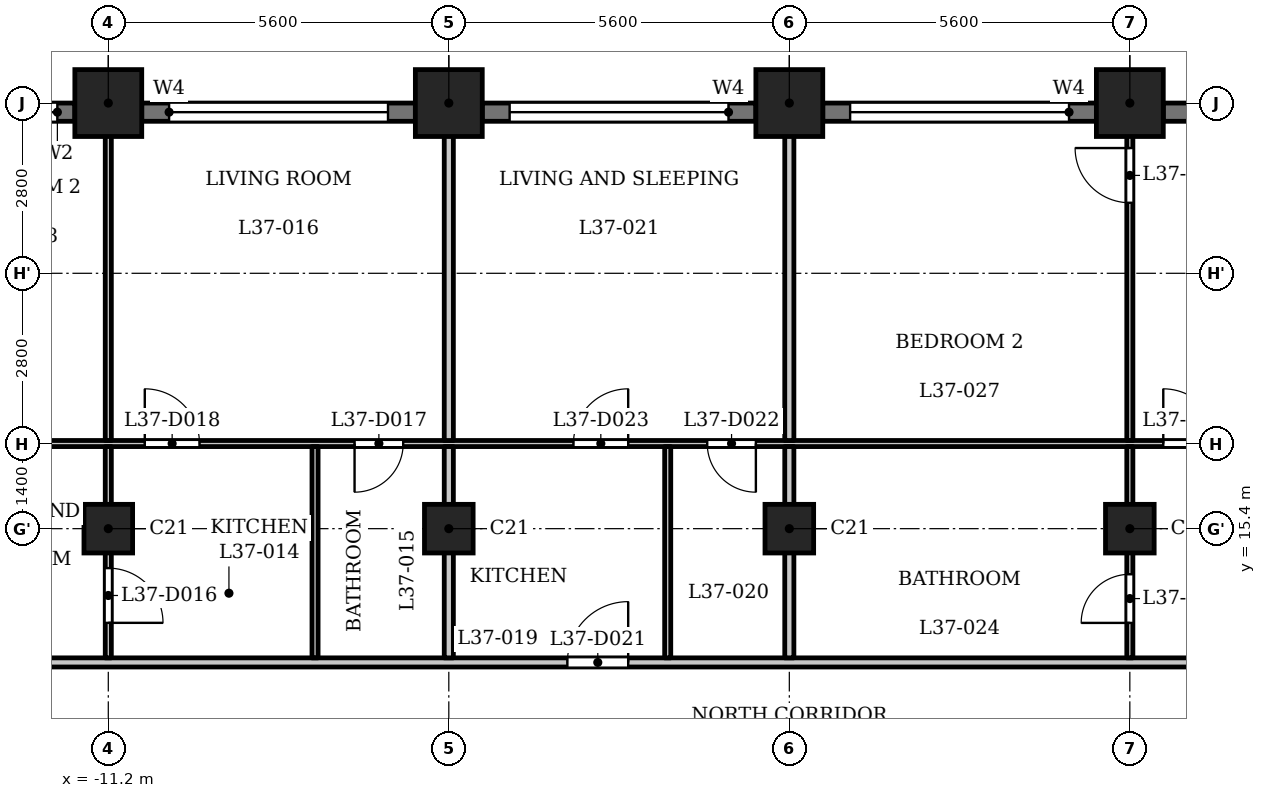
"""IFC4 building model, lengths in metres.
Left out: names, types, materials, properties, quantities, classifications, styles, units other than length and angle.
Written with IfcOpenShell. Run it as: python <this file> out.ifc"""

import sys

from ifc_helpers import new_model, si_unit, direction, frame, frame_2d, origin, origin_2d, place, context, subcontext, project, spatial, rectangle, extrude, element, fill, save


model = new_model("IFC4")
c1 = context("Model", 3, precision=1e-05, world=origin(), true_north=direction((0.0, 1.0)))
c2 = subcontext(c1, "Body", "Model", "MODEL_VIEW")
j1 = project(units=[si_unit("LENGTHUNIT", "METRE"), si_unit("PLANEANGLEUNIT", "RADIAN")], contexts=[c1])
p1 = place(None, origin())
s1 = spatial("IfcSite", under=j1, at=p1, CompositionType="ELEMENT")
p2 = place(p1, origin())
s2 = spatial("IfcBuilding", under=s1, at=p2, CompositionType="ELEMENT")
p3 = place(p2, frame((0.0, 0.0, 146.6)))
s3 = spatial("IfcBuildingStorey", under=s2, at=p3, CompositionType="ELEMENT", Elevation=146.6)
for number, where, z_axis, x_axis in (
    (1, (5.6, 22.4, 0.0), (0.0, 0.0, 1.0), (1.0, 0.0, 0.0)),
    (2, (0.0, 22.4, 0.0), (0.0, 0.0, 1.0), (1.0, 0.0, 0.0)),
    (3, (-5.6, 22.4, 0.0), (0.0, 0.0, 1.0), (1.0, 0.0, 0.0)),
    (4, (-11.2, 22.4, 0.0), (0.0, 0.0, 1.0), (1.0, 0.0, 0.0)),
):
    element("IfcColumn", number, at=place(p3, frame(where, z_axis=z_axis, x_axis=x_axis)), inside=s3, PredefinedType="COLUMN", context=c2, shape_type="SweptSolid", body=[
        extrude(rectangle(XDim=1.1, YDim=1.1, at=origin_2d()), origin(), (0.0, 0.0, 1.0), 3.5),
    ])
for number, where, z_axis, x_axis in (
    (5, (-11.2, 15.4, 0.0), (0.0, 0.0, 1.0), (1.0, 0.0, 0.0)),
    (6, (-5.6, 15.4, 0.0), (0.0, 0.0, 1.0), (1.0, 0.0, 0.0)),
    (7, (0.0, 15.4, 0.0), (0.0, 0.0, 1.0), (1.0, 0.0, 0.0)),
    (8, (5.6, 15.4, 0.0), (0.0, 0.0, 1.0), (1.0, 0.0, 0.0)),
):
    element("IfcColumn", number, at=place(p3, frame(where, z_axis=z_axis, x_axis=x_axis)), inside=s3, PredefinedType="COLUMN", context=c2, shape_type="SweptSolid", body=[
        extrude(rectangle(XDim=0.8, YDim=0.8, at=origin_2d()), origin(), (0.0, 0.0, 1.0), 3.5),
    ])
p4 = place(p3, frame((10.65, 22.25, 0.0), z_axis=(0.0, 0.0, 1.0), x_axis=(-1.0, 0.0, 0.0)))
e9 = element("IfcWall", 9, at=p4, inside=s3, PredefinedType="SOLIDWALL", context=c2, shape_type="SweptSolid", body=[
    extrude(rectangle(XDim=4.5, YDim=0.3, at=frame_2d((2.25, 0.0))), origin(), (0.0, 0.0, 1.0), 2.45),
])
p5 = place(p4, frame((0.45, 0.0, 1.2)))
e10 = element("IfcOpeningElement", 10, at=p5, cuts=e9, PredefinedType="OPENING", context=c2, shape_type="SweptSolid", body=[
    extrude(rectangle(XDim=3.6, YDim=0.95, at=frame_2d((1.8, 0.475))), frame((0.0, 0.16, 0.0), z_axis=(0.0, -1.0, 0.0), x_axis=(1.0, 0.0, 0.0)), (0.0, 0.0, 1.0), 0.32),
])
p6 = place(p3, frame((5.05, 22.25, 0.0), z_axis=(0.0, 0.0, 1.0), x_axis=(-1.0, 0.0, 0.0)))
e11 = element("IfcWall", 11, at=p6, inside=s3, PredefinedType="SOLIDWALL", context=c2, shape_type="SweptSolid", body=[
    extrude(rectangle(XDim=4.5, YDim=0.3, at=frame_2d((2.25, 0.0))), origin(), (0.0, 0.0, 1.0), 2.45),
])
p7 = place(p6, frame((0.45, 0.0, 1.2)))
e12 = element("IfcOpeningElement", 12, at=p7, cuts=e11, PredefinedType="OPENING", context=c2, shape_type="SweptSolid", body=[
    extrude(rectangle(XDim=3.6, YDim=0.95, at=frame_2d((1.8, 0.475))), frame((0.0, 0.16, 0.0), z_axis=(0.0, -1.0, 0.0), x_axis=(1.0, 0.0, 0.0)), (0.0, 0.0, 1.0), 0.32),
])
p8 = place(p3, frame((-0.55, 22.25, 0.0), z_axis=(0.0, 0.0, 1.0), x_axis=(-1.0, 0.0, 0.0)))
e13 = element("IfcWall", 13, at=p8, inside=s3, PredefinedType="SOLIDWALL", context=c2, shape_type="SweptSolid", body=[
    extrude(rectangle(XDim=4.5, YDim=0.3, at=frame_2d((2.25, 0.0))), origin(), (0.0, 0.0, 1.0), 2.45),
])
p9 = place(p8, frame((0.45, 0.0, 1.2)))
e14 = element("IfcOpeningElement", 14, at=p9, cuts=e13, PredefinedType="OPENING", context=c2, shape_type="SweptSolid", body=[
    extrude(rectangle(XDim=3.6, YDim=0.95, at=frame_2d((1.8, 0.475))), frame((0.0, 0.16, 0.0), z_axis=(0.0, -1.0, 0.0), x_axis=(1.0, 0.0, 0.0)), (0.0, 0.0, 1.0), 0.32),
])
p10 = place(p3, frame((-6.15, 22.25, 0.0), z_axis=(0.0, 0.0, 1.0), x_axis=(-1.0, 0.0, 0.0)))
e15 = element("IfcWall", 15, at=p10, inside=s3, PredefinedType="SOLIDWALL", context=c2, shape_type="SweptSolid", body=[
    extrude(rectangle(XDim=4.5, YDim=0.3, at=frame_2d((2.25, 0.0))), origin(), (0.0, 0.0, 1.0), 2.45),
])
p11 = place(p10, frame((0.45, 0.0, 1.2)))
e16 = element("IfcOpeningElement", 16, at=p11, cuts=e15, PredefinedType="OPENING", context=c2, shape_type="SweptSolid", body=[
    extrude(rectangle(XDim=3.6, YDim=0.95, at=frame_2d((1.8, 0.475))), frame((0.0, 0.16, 0.0), z_axis=(0.0, -1.0, 0.0), x_axis=(1.0, 0.0, 0.0)), (0.0, 0.0, 1.0), 0.32),
])
p12 = place(p3, frame((-11.75, 22.25, 0.0), z_axis=(0.0, 0.0, 1.0), x_axis=(-1.0, 0.0, 0.0)))
e17 = element("IfcWall", 17, at=p12, inside=s3, PredefinedType="SOLIDWALL", context=c2, shape_type="SweptSolid", body=[
    extrude(rectangle(XDim=4.5, YDim=0.3, at=frame_2d((2.25, 0.0))), origin(), (0.0, 0.0, 1.0), 2.45),
])
p13 = place(p12, frame((0.288, 0.0, 0.9)))
e18 = element("IfcOpeningElement", 18, at=p13, cuts=e17, PredefinedType="OPENING", context=c2, shape_type="SweptSolid", body=[
    extrude(rectangle(XDim=1.8, YDim=1.25, at=frame_2d((0.9, 0.625))), frame((0.0, 0.16, 0.0), z_axis=(0.0, -1.0, 0.0), x_axis=(1.0, 0.0, 0.0)), (0.0, 0.0, 1.0), 0.32),
])
p14 = place(p12, frame((2.913, 0.0, 0.6)))
e19 = element("IfcOpeningElement", 19, at=p14, cuts=e17, PredefinedType="OPENING", context=c2, shape_type="SweptSolid", body=[
    extrude(rectangle(XDim=1.2, YDim=1.55, at=frame_2d((0.6, 0.775))), frame((0.0, 0.16, 0.0), z_axis=(0.0, -1.0, 0.0), x_axis=(1.0, 0.0, 0.0)), (0.0, 0.0, 1.0), 0.32),
])
p15 = place(p3, frame((-17.4, 13.2, 0.0), z_axis=(0.0, 0.0, 1.0), x_axis=(1.0, 0.0, 0.0)))
e20 = element("IfcWall", 20, at=p15, inside=s3, PredefinedType="PARTITIONING", context=c2, shape_type="SweptSolid", body=[
    extrude(rectangle(XDim=34.8, YDim=0.15, at=frame_2d((17.4, 0.0))), origin(), (0.0, 0.0, 1.0), 3.2),
])
p16 = place(p15, frame((0.25, 0.0, 0.0)))
e21 = element("IfcOpeningElement", 21, at=p16, cuts=e20, PredefinedType="OPENING", context=c2, shape_type="SweptSolid", body=[
    extrude(rectangle(XDim=1.0, YDim=2.1, at=frame_2d((0.5, 1.05))), frame((0.0, 0.085, 0.0), z_axis=(0.0, -1.0, 0.0), x_axis=(1.0, 0.0, 0.0)), (0.0, 0.0, 1.0), 0.17),
])
p17 = place(p15, frame((33.65, 0.0, 0.0)))
e22 = element("IfcOpeningElement", 22, at=p17, cuts=e20, PredefinedType="OPENING", context=c2, shape_type="SweptSolid", body=[
    extrude(rectangle(XDim=1.0, YDim=2.1, at=frame_2d((0.5, 1.05))), frame((0.0, 0.085, 0.0), z_axis=(0.0, -1.0, 0.0), x_axis=(1.0, 0.0, 0.0)), (0.0, 0.0, 1.0), 0.17),
])
p18 = place(p15, frame((13.75, 0.0, 0.0)))
e23 = element("IfcOpeningElement", 23, at=p18, cuts=e20, PredefinedType="OPENING", context=c2, shape_type="SweptSolid", body=[
    extrude(rectangle(XDim=1.0, YDim=2.1, at=frame_2d((0.5, 1.05))), frame((0.0, 0.085, 0.0), z_axis=(0.0, -1.0, 0.0), x_axis=(1.0, 0.0, 0.0)), (0.0, 0.0, 1.0), 0.17),
])
p19 = place(p3, frame((-16.725, 16.8, 0.0), z_axis=(0.0, 0.0, 1.0), x_axis=(1.0, 0.0, 0.0)))
e24 = element("IfcWall", 24, at=p19, inside=s3, PredefinedType="PARTITIONING", context=c2, shape_type="SweptSolid", body=[
    extrude(rectangle(XDim=33.45, YDim=0.1, at=frame_2d((16.725, 0.0))), origin(), (0.0, 0.0, 1.0), 3.2),
])
p20 = place(p19, frame((9.575, 0.0, 0.0)))
e25 = element("IfcOpeningElement", 25, at=p20, cuts=e24, PredefinedType="OPENING", context=c2, shape_type="SweptSolid", body=[
    extrude(rectangle(XDim=0.8, YDim=2.1, at=frame_2d((0.4, 1.05))), frame((0.0, 0.06, 0.0), z_axis=(0.0, -1.0, 0.0), x_axis=(1.0, 0.0, 0.0)), (0.0, 0.0, 1.0), 0.12),
])
p21 = place(p19, frame((6.125, 0.0, 0.0)))
e26 = element("IfcOpeningElement", 26, at=p21, cuts=e24, PredefinedType="OPENING", context=c2, shape_type="SweptSolid", body=[
    extrude(rectangle(XDim=0.9, YDim=2.1, at=frame_2d((0.45, 1.05))), frame((0.0, 0.06, 0.0), z_axis=(0.0, -1.0, 0.0), x_axis=(1.0, 0.0, 0.0)), (0.0, 0.0, 1.0), 0.12),
])
p22 = place(p19, frame((0.975, 0.0, 0.0)))
e27 = element("IfcOpeningElement", 27, at=p22, cuts=e24, PredefinedType="OPENING", context=c2, shape_type="SweptSolid", body=[
    extrude(rectangle(XDim=0.9, YDim=2.1, at=frame_2d((0.45, 1.05))), frame((0.0, 0.06, 0.0), z_axis=(0.0, -1.0, 0.0), x_axis=(1.0, 0.0, 0.0)), (0.0, 0.0, 1.0), 0.12),
])
p23 = place(p19, frame((3.225, 0.0, 0.0)))
e28 = element("IfcOpeningElement", 28, at=p23, cuts=e24, PredefinedType="OPENING", context=c2, shape_type="SweptSolid", body=[
    extrude(rectangle(XDim=0.9, YDim=2.1, at=frame_2d((0.45, 1.05))), frame((0.0, 0.06, 0.0), z_axis=(0.0, -1.0, 0.0), x_axis=(1.0, 0.0, 0.0)), (0.0, 0.0, 1.0), 0.12),
])
p24 = place(p19, frame((15.375, 0.0, 0.0)))
e29 = element("IfcOpeningElement", 29, at=p24, cuts=e24, PredefinedType="OPENING", context=c2, shape_type="SweptSolid", body=[
    extrude(rectangle(XDim=0.8, YDim=2.1, at=frame_2d((0.4, 1.05))), frame((0.0, 0.06, 0.0), z_axis=(0.0, -1.0, 0.0), x_axis=(1.0, 0.0, 0.0)), (0.0, 0.0, 1.0), 0.12),
])
p25 = place(p19, frame((13.175, 0.0, 0.0)))
e30 = element("IfcOpeningElement", 30, at=p25, cuts=e24, PredefinedType="OPENING", context=c2, shape_type="SweptSolid", body=[
    extrude(rectangle(XDim=0.9, YDim=2.1, at=frame_2d((0.45, 1.05))), frame((0.0, 0.06, 0.0), z_axis=(0.0, -1.0, 0.0), x_axis=(1.0, 0.0, 0.0)), (0.0, 0.0, 1.0), 0.12),
])
p26 = place(p19, frame((31.975, 0.0, 0.0)))
e31 = element("IfcOpeningElement", 31, at=p26, cuts=e24, PredefinedType="OPENING", context=c2, shape_type="SweptSolid", body=[
    extrude(rectangle(XDim=0.9, YDim=2.1, at=frame_2d((0.45, 1.05))), frame((0.0, 0.06, 0.0), z_axis=(0.0, -1.0, 0.0), x_axis=(1.0, 0.0, 0.0)), (0.0, 0.0, 1.0), 0.12),
])
p27 = place(p19, frame((22.875, 0.0, 0.0)))
e32 = element("IfcOpeningElement", 32, at=p27, cuts=e24, PredefinedType="OPENING", context=c2, shape_type="SweptSolid", body=[
    extrude(rectangle(XDim=0.9, YDim=2.1, at=frame_2d((0.45, 1.05))), frame((0.0, 0.06, 0.0), z_axis=(0.0, -1.0, 0.0), x_axis=(1.0, 0.0, 0.0)), (0.0, 0.0, 1.0), 0.12),
])
p28 = place(p3, frame((-11.2, 13.275, 0.0), z_axis=(0.0, 0.0, 1.0), x_axis=(0.0, 1.0, 0.0)))
e33 = element("IfcWall", 33, at=p28, inside=s3, PredefinedType="PARTITIONING", context=c2, shape_type="SweptSolid", body=[
    extrude(rectangle(XDim=3.475, YDim=0.1, at=frame_2d((1.738, 0.0))), origin(), (0.0, 0.0, 1.0), 3.2),
])
p29 = place(p28, frame((0.576, 0.0, 0.0)))
e34 = element("IfcOpeningElement", 34, at=p29, cuts=e33, PredefinedType="OPENING", context=c2, shape_type="SweptSolid", body=[
    extrude(rectangle(XDim=0.9, YDim=2.1, at=frame_2d((0.45, 1.05))), frame((0.0, 0.06, 0.0), z_axis=(0.0, -1.0, 0.0), x_axis=(1.0, 0.0, 0.0)), (0.0, 0.0, 1.0), 0.12),
])
p30 = place(p3, frame((-11.2, 16.85, 0.0), z_axis=(0.0, 0.0, 1.0), x_axis=(0.0, 1.0, 0.0)))
e35 = element("IfcWall", 35, at=p30, inside=s3, PredefinedType="PARTITIONING", context=c2, shape_type="SweptSolid", body=[
    extrude(rectangle(XDim=6.08, YDim=0.1, at=frame_2d((3.04, 0.0))), origin(), (0.0, 0.0, 1.0), 3.2),
])
p31 = place(p3, frame((-7.8, 13.275, 0.0), z_axis=(0.0, 0.0, 1.0), x_axis=(0.0, 1.0, 0.0)))
e36 = element("IfcWall", 36, at=p31, inside=s3, PredefinedType="PARTITIONING", context=c2, shape_type="SweptSolid", body=[
    extrude(rectangle(XDim=3.475, YDim=0.1, at=frame_2d((1.738, 0.0))), origin(), (0.0, 0.0, 1.0), 3.2),
])
p32 = place(p3, frame((-5.6, 13.275, 0.0), z_axis=(0.0, 0.0, 1.0), x_axis=(0.0, 1.0, 0.0)))
e37 = element("IfcWall", 37, at=p32, inside=s3, PredefinedType="PARTITIONING", context=c2, shape_type="SweptSolid", body=[
    extrude(rectangle(XDim=3.475, YDim=0.15, at=frame_2d((1.738, 0.0))), origin(), (0.0, 0.0, 1.0), 3.2),
])
p33 = place(p3, frame((-5.6, 16.85, 0.0), z_axis=(0.0, 0.0, 1.0), x_axis=(0.0, 1.0, 0.0)))
e38 = element("IfcWall", 38, at=p33, inside=s3, PredefinedType="PARTITIONING", context=c2, shape_type="SweptSolid", body=[
    extrude(rectangle(XDim=6.08, YDim=0.15, at=frame_2d((3.04, 0.0))), origin(), (0.0, 0.0, 1.0), 3.2),
])
p34 = place(p3, frame((-2.0, 13.275, 0.0), z_axis=(0.0, 0.0, 1.0), x_axis=(0.0, 1.0, 0.0)))
e39 = element("IfcWall", 39, at=p34, inside=s3, PredefinedType="PARTITIONING", context=c2, shape_type="SweptSolid", body=[
    extrude(rectangle(XDim=3.475, YDim=0.1, at=frame_2d((1.738, 0.0))), origin(), (0.0, 0.0, 1.0), 3.2),
])
p35 = place(p3, frame((0.0, 13.275, 0.0), z_axis=(0.0, 0.0, 1.0), x_axis=(0.0, 1.0, 0.0)))
e40 = element("IfcWall", 40, at=p35, inside=s3, PredefinedType="PARTITIONING", context=c2, shape_type="SweptSolid", body=[
    extrude(rectangle(XDim=3.475, YDim=0.15, at=frame_2d((1.738, 0.0))), origin(), (0.0, 0.0, 1.0), 3.2),
])
p36 = place(p3, frame((0.0, 16.85, 0.0), z_axis=(0.0, 0.0, 1.0), x_axis=(0.0, 1.0, 0.0)))
e41 = element("IfcWall", 41, at=p36, inside=s3, PredefinedType="PARTITIONING", context=c2, shape_type="SweptSolid", body=[
    extrude(rectangle(XDim=6.08, YDim=0.15, at=frame_2d((3.04, 0.0))), origin(), (0.0, 0.0, 1.0), 3.2),
])
p37 = place(p3, frame((5.6, 13.275, 0.0), z_axis=(0.0, 0.0, 1.0), x_axis=(0.0, 1.0, 0.0)))
e42 = element("IfcWall", 42, at=p37, inside=s3, PredefinedType="PARTITIONING", context=c2, shape_type="SweptSolid", body=[
    extrude(rectangle(XDim=3.475, YDim=0.1, at=frame_2d((1.738, 0.0))), origin(), (0.0, 0.0, 1.0), 3.2),
])
p38 = place(p37, frame((0.575, 0.0, 0.0)))
e43 = element("IfcOpeningElement", 43, at=p38, cuts=e42, PredefinedType="OPENING", context=c2, shape_type="SweptSolid", body=[
    extrude(rectangle(XDim=0.8, YDim=2.1, at=frame_2d((0.4, 1.05))), frame((0.0, 0.06, 0.0), z_axis=(0.0, -1.0, 0.0), x_axis=(1.0, 0.0, 0.0)), (0.0, 0.0, 1.0), 0.12),
])
p39 = place(p3, frame((5.6, 16.85, 0.0), z_axis=(0.0, 0.0, 1.0), x_axis=(0.0, 1.0, 0.0)))
e44 = element("IfcWall", 44, at=p39, inside=s3, PredefinedType="PARTITIONING", context=c2, shape_type="SweptSolid", body=[
    extrude(rectangle(XDim=6.08, YDim=0.1, at=frame_2d((3.04, 0.0))), origin(), (0.0, 0.0, 1.0), 3.2),
])
p40 = place(p39, frame((3.91, 0.0, 0.0)))
e45 = element("IfcOpeningElement", 45, at=p40, cuts=e44, PredefinedType="OPENING", context=c2, shape_type="SweptSolid", body=[
    extrude(rectangle(XDim=0.9, YDim=2.1, at=frame_2d((0.45, 1.05))), frame((0.0, 0.06, 0.0), z_axis=(0.0, -1.0, 0.0), x_axis=(1.0, 0.0, 0.0)), (0.0, 0.0, 1.0), 0.12),
])
p41 = place(p29, origin())
e46 = element("IfcDoor", 46, at=p41, inside=s3, OperationType="SINGLE_SWING_LEFT", PredefinedType="DOOR", context=c2, shape_type="SweptSolid", body=[
    extrude(rectangle(XDim=0.9, YDim=2.1, at=frame_2d((0.45, 1.05))), frame((0.0, 0.025, 0.0), z_axis=(0.0, -1.0, 0.0), x_axis=(1.0, 0.0, 0.0)), (0.0, 0.0, 1.0), 0.05),
])
fill(e34, e46)
p42 = place(p20, origin())
e47 = element("IfcDoor", 47, at=p42, inside=s3, OperationType="SINGLE_SWING_LEFT", PredefinedType="DOOR", context=c2, shape_type="SweptSolid", body=[
    extrude(rectangle(XDim=0.8, YDim=2.1, at=frame_2d((0.4, 1.05))), frame((0.0, 0.025, 0.0), z_axis=(0.0, -1.0, 0.0), x_axis=(1.0, 0.0, 0.0)), (0.0, 0.0, 1.0), 0.05),
])
fill(e25, e47)
p43 = place(p21, origin())
e48 = element("IfcDoor", 48, at=p43, inside=s3, OperationType="SINGLE_SWING_RIGHT", PredefinedType="DOOR", context=c2, shape_type="SweptSolid", body=[
    extrude(rectangle(XDim=0.9, YDim=2.1, at=frame_2d((0.45, 1.05))), frame((0.0, 0.025, 0.0), z_axis=(0.0, -1.0, 0.0), x_axis=(1.0, 0.0, 0.0)), (0.0, 0.0, 1.0), 0.05),
])
fill(e26, e48)
p44 = place(p18, origin())
e49 = element("IfcDoor", 49, at=p44, inside=s3, OperationType="SINGLE_SWING_LEFT", PredefinedType="DOOR", context=c2, shape_type="SweptSolid", body=[
    extrude(rectangle(XDim=1.0, YDim=2.1, at=frame_2d((0.5, 1.05))), frame((0.0, 0.025, 0.0), z_axis=(0.0, -1.0, 0.0), x_axis=(1.0, 0.0, 0.0)), (0.0, 0.0, 1.0), 0.05),
])
fill(e23, e49)
p45 = place(p24, origin())
e50 = element("IfcDoor", 50, at=p45, inside=s3, OperationType="SINGLE_SWING_RIGHT", PredefinedType="DOOR", context=c2, shape_type="SweptSolid", body=[
    extrude(rectangle(XDim=0.8, YDim=2.1, at=frame_2d((0.4, 1.05))), frame((0.0, 0.025, 0.0), z_axis=(0.0, -1.0, 0.0), x_axis=(1.0, 0.0, 0.0)), (0.0, 0.0, 1.0), 0.05),
])
fill(e29, e50)
p46 = place(p25, origin())
e51 = element("IfcDoor", 51, at=p46, inside=s3, OperationType="SINGLE_SWING_LEFT", PredefinedType="DOOR", context=c2, shape_type="SweptSolid", body=[
    extrude(rectangle(XDim=0.9, YDim=2.1, at=frame_2d((0.45, 1.05))), frame((0.0, 0.025, 0.0), z_axis=(0.0, -1.0, 0.0), x_axis=(1.0, 0.0, 0.0)), (0.0, 0.0, 1.0), 0.05),
])
fill(e30, e51)
p47 = place(p38, origin())
e52 = element("IfcDoor", 52, at=p47, inside=s3, OperationType="SINGLE_SWING_RIGHT", PredefinedType="DOOR", context=c2, shape_type="SweptSolid", body=[
    extrude(rectangle(XDim=0.8, YDim=2.1, at=frame_2d((0.4, 1.05))), frame((0.0, 0.025, 0.0), z_axis=(0.0, -1.0, 0.0), x_axis=(1.0, 0.0, 0.0)), (0.0, 0.0, 1.0), 0.05),
])
fill(e43, e52)
p48 = place(p27, origin())
e53 = element("IfcDoor", 53, at=p48, inside=s3, OperationType="SINGLE_SWING_RIGHT", PredefinedType="DOOR", context=c2, shape_type="SweptSolid", body=[
    extrude(rectangle(XDim=0.9, YDim=2.1, at=frame_2d((0.45, 1.05))), frame((0.0, 0.025, 0.0), z_axis=(0.0, -1.0, 0.0), x_axis=(1.0, 0.0, 0.0)), (0.0, 0.0, 1.0), 0.05),
])
fill(e32, e53)
p49 = place(p40, origin())
e54 = element("IfcDoor", 54, at=p49, inside=s3, OperationType="SINGLE_SWING_LEFT", PredefinedType="DOOR", context=c2, shape_type="SweptSolid", body=[
    extrude(rectangle(XDim=0.9, YDim=2.1, at=frame_2d((0.45, 1.05))), frame((0.0, 0.025, 0.0), z_axis=(0.0, -1.0, 0.0), x_axis=(1.0, 0.0, 0.0)), (0.0, 0.0, 1.0), 0.05),
])
fill(e45, e54)
p50 = place(p7, origin())
e55 = element("IfcWindow", 55, at=p50, inside=s3, PartitioningType="SINGLE_PANEL", PredefinedType="WINDOW", context=c2, shape_type="SweptSolid", body=[
    extrude(rectangle(XDim=3.6, YDim=0.95, at=frame_2d((1.8, 0.475))), frame((0.0, 0.03, 0.0), z_axis=(0.0, -1.0, 0.0), x_axis=(1.0, 0.0, 0.0)), (0.0, 0.0, 1.0), 0.06),
])
fill(e12, e55)
p51 = place(p9, origin())
e56 = element("IfcWindow", 56, at=p51, inside=s3, PartitioningType="SINGLE_PANEL", PredefinedType="WINDOW", context=c2, shape_type="SweptSolid", body=[
    extrude(rectangle(XDim=3.6, YDim=0.95, at=frame_2d((1.8, 0.475))), frame((0.0, 0.03, 0.0), z_axis=(0.0, -1.0, 0.0), x_axis=(1.0, 0.0, 0.0)), (0.0, 0.0, 1.0), 0.06),
])
fill(e14, e56)
p52 = place(p11, origin())
e57 = element("IfcWindow", 57, at=p52, inside=s3, PartitioningType="SINGLE_PANEL", PredefinedType="WINDOW", context=c2, shape_type="SweptSolid", body=[
    extrude(rectangle(XDim=3.6, YDim=0.95, at=frame_2d((1.8, 0.475))), frame((0.0, 0.03, 0.0), z_axis=(0.0, -1.0, 0.0), x_axis=(1.0, 0.0, 0.0)), (0.0, 0.0, 1.0), 0.06),
])
fill(e16, e57)
p53 = place(p13, origin())
e58 = element("IfcWindow", 58, at=p53, inside=s3, PartitioningType="SINGLE_PANEL", PredefinedType="WINDOW", context=c2, shape_type="SweptSolid", body=[
    extrude(rectangle(XDim=1.8, YDim=1.25, at=frame_2d((0.9, 0.625))), frame((0.0, 0.03, 0.0), z_axis=(0.0, -1.0, 0.0), x_axis=(1.0, 0.0, 0.0)), (0.0, 0.0, 1.0), 0.06),
])
fill(e18, e58)
save(model, sys.argv[1])
